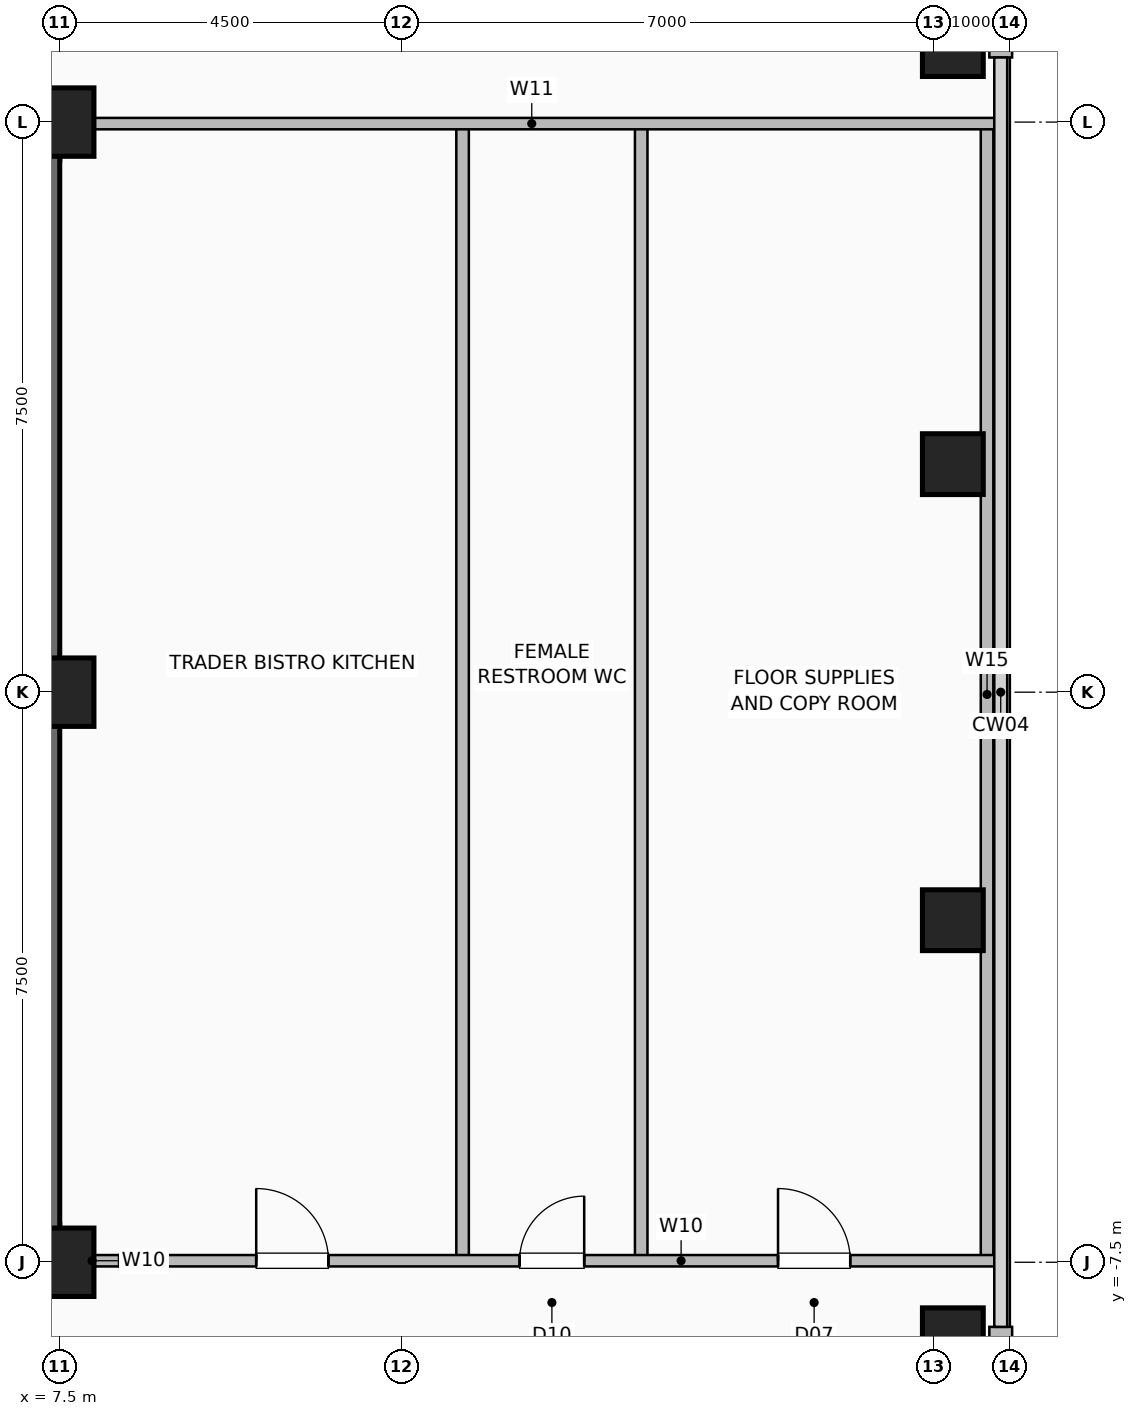
"""IFC4 building model, lengths in metres.
Left out: names, types, materials, properties, quantities, classifications, styles, units other than length and angle.
Written with IfcOpenShell. Run it as: python <this file> out.ifc"""

import sys

from ifc_helpers import new_model, si_unit, direction, frame, frame_2d, origin, origin_2d, place, context, subcontext, project, spatial, rectangle, hollow_rectangle, extrude, element, fill, save


model = new_model("IFC4")
c1 = context("Model", 3, precision=1e-05, world=origin(), true_north=direction((0.0, 1.0)))
c2 = subcontext(c1, "Body", "Model", "MODEL_VIEW")
j1 = project(units=[si_unit("LENGTHUNIT", "METRE"), si_unit("PLANEANGLEUNIT", "RADIAN")], contexts=[c1])
p1 = place(None, origin())
s1 = spatial("IfcSite", under=j1, at=p1, CompositionType="ELEMENT")
p2 = place(p1, origin())
s2 = spatial("IfcBuilding", under=s1, at=p2, CompositionType="ELEMENT")
p3 = place(p2, frame((0.0, 0.0, 213.0)))
s3 = spatial("IfcBuildingStorey", under=s2, at=p3, CompositionType="ELEMENT", Elevation=213.0)
for number, where, z_axis, x_axis in (
    (1, (7.5, -7.5, 0.0), (0.0, 0.0, 1.0), (1.0, 0.0, 0.0)),
    (2, (7.5, 0.0, 0.0), (0.0, 0.0, 1.0), (1.0, 0.0, 0.0)),
    (3, (7.5, 7.5, 0.0), (0.0, 0.0, 1.0), (1.0, 0.0, 0.0)),
):
    element("IfcColumn", number, at=place(p3, frame(where, z_axis=z_axis, x_axis=x_axis)), inside=s3, PredefinedType="COLUMN", context=c2, shape_type="SweptSolid", body=[
        extrude(hollow_rectangle(XDim=0.9, YDim=0.9, WallThickness=0.045, at=origin_2d()), origin(), (0.0, 0.0, 1.0), 3.6),
    ])
for number, where, z_axis, x_axis in (
    (4, (19.25, -8.5, 0.0), (0.0, 0.0, 1.0), (1.0, 0.0, 0.0)),
    (5, (19.25, -3.0, 0.0), (0.0, 0.0, 1.0), (1.0, 0.0, 0.0)),
    (6, (19.25, 3.0, 0.0), (0.0, 0.0, 1.0), (1.0, 0.0, 0.0)),
    (7, (19.25, 8.5, 0.0), (0.0, 0.0, 1.0), (1.0, 0.0, 0.0)),
):
    element("IfcColumn", number, at=place(p3, frame(where, z_axis=z_axis, x_axis=x_axis)), inside=s3, PredefinedType="COLUMN", context=c2, shape_type="SweptSolid", body=[
        extrude(hollow_rectangle(XDim=0.8, YDim=0.8, WallThickness=0.04, at=origin_2d()), origin(), (0.0, 0.0, 1.0), 3.6),
    ])
for number, where, z_axis, x_axis in (
    (8, (19.88, -13.15, 0.0), (0.0, 0.0, 1.0), (0.0, 1.0, 0.0)),
    (9, (19.88, 8.35, 0.0), (0.0, 0.0, 1.0), (0.0, 1.0, 0.0)),
):
    element("IfcWall", number, at=place(p3, frame(where, z_axis=z_axis, x_axis=x_axis)), inside=s3, PredefinedType="SOLIDWALL", context=c2, shape_type="SweptSolid", body=[
        extrude(rectangle(XDim=4.8, YDim=0.3, at=frame_2d((2.4, 0.0))), origin(), (0.0, 0.0, 1.0), 3.36),
    ])
p4 = place(p3, frame((-7.5, -7.25, 0.0), z_axis=(0.0, 0.0, 1.0), x_axis=(1.0, 0.0, 0.0)))
e10 = element("IfcWall", 10, at=p4, inside=s3, PredefinedType="SHEAR", context=c2, shape_type="SweptSolid", body=[
    extrude(rectangle(XDim=15.0, YDim=0.5, at=frame_2d((7.5, 0.0))), origin(), (0.0, 0.0, 1.0), 3.36),
])
p5 = place(p4, frame((1.55, 0.0, 0.0)))
e11 = element("IfcOpeningElement", 11, at=p5, cuts=e10, PredefinedType="OPENING", context=c2, shape_type="SweptSolid", body=[
    extrude(rectangle(XDim=1.05, YDim=2.08, at=frame_2d((0.525, 1.04))), frame((0.0, 0.26, 0.0), z_axis=(0.0, -1.0, 0.0), x_axis=(1.0, 0.0, 0.0)), (0.0, 0.0, 1.0), 0.52),
])
p6 = place(p4, frame((12.4, 0.0, 0.0)))
e12 = element("IfcOpeningElement", 12, at=p6, cuts=e10, PredefinedType="OPENING", context=c2, shape_type="SweptSolid", body=[
    extrude(rectangle(XDim=1.05, YDim=2.08, at=frame_2d((0.525, 1.04))), frame((0.0, 0.26, 0.0), z_axis=(0.0, -1.0, 0.0), x_axis=(1.0, 0.0, 0.0)), (0.0, 0.0, 1.0), 0.52),
])
p7 = place(p4, frame((5.2, 0.0, 0.0)))
e13 = element("IfcOpeningElement", 13, at=p7, cuts=e10, PredefinedType="OPENING", context=c2, shape_type="SweptSolid", body=[
    extrude(rectangle(XDim=1.0, YDim=2.08, at=frame_2d((0.5, 1.04))), frame((0.0, 0.26, 0.0), z_axis=(0.0, -1.0, 0.0), x_axis=(1.0, 0.0, 0.0)), (0.0, 0.0, 1.0), 0.52),
])
p8 = place(p4, frame((8.65, 0.0, 0.0)))
e14 = element("IfcOpeningElement", 14, at=p8, cuts=e10, PredefinedType="OPENING", context=c2, shape_type="SweptSolid", body=[
    extrude(rectangle(XDim=1.0, YDim=2.08, at=frame_2d((0.5, 1.04))), frame((0.0, 0.26, 0.0), z_axis=(0.0, -1.0, 0.0), x_axis=(1.0, 0.0, 0.0)), (0.0, 0.0, 1.0), 0.52),
])
for number, where, z_axis, x_axis in (
    (15, (-7.5, 7.25, 0.0), (0.0, 0.0, 1.0), (1.0, 0.0, 0.0)),
    (16, (7.25, -7.5, 0.0), (0.0, 0.0, 1.0), (0.0, 1.0, 0.0)),
):
    element("IfcWall", number, at=place(p3, frame(where, z_axis=z_axis, x_axis=x_axis)), inside=s3, PredefinedType="SHEAR", context=c2, shape_type="SweptSolid", body=[
        extrude(rectangle(XDim=15.0, YDim=0.5, at=frame_2d((7.5, 0.0))), origin(), (0.0, 0.0, 1.0), 3.36),
    ])
p9 = place(p3, frame((7.45, -7.48, 0.0), z_axis=(0.0, 0.0, 1.0), x_axis=(1.0, 0.0, 0.0)))
e17 = element("IfcWall", 17, at=p9, inside=s3, PredefinedType="PARTITIONING", context=c2, shape_type="SweptSolid", body=[
    extrude(rectangle(XDim=0.95, YDim=0.15, at=frame_2d((0.475, 0.0))), origin(), (0.0, 0.0, 1.0), 3.36),
])
for number, where, z_axis, x_axis in (
    (18, (15.15, -7.48, 0.0), (0.0, 0.0, 1.0), (0.0, 1.0, 0.0)),
    (19, (12.8, -7.48, 0.0), (0.0, 0.0, 1.0), (0.0, 1.0, 0.0)),
    (20, (19.7, -7.48, 0.0), (0.0, 0.0, 1.0), (0.0, 1.0, 0.0)),
):
    element("IfcWall", number, at=place(p3, frame(where, z_axis=z_axis, x_axis=x_axis)), inside=s3, PredefinedType="PLUMBINGWALL", context=c2, shape_type="SweptSolid", body=[
        extrude(rectangle(XDim=14.9, YDim=0.165, at=frame_2d((7.45, 0.0))), origin(), (0.0, 0.0, 1.0), 3.36),
    ])
p10 = place(p3, frame((8.28, -7.48, 0.0), z_axis=(0.0, 0.0, 1.0), x_axis=(1.0, 0.0, 0.0)))
e21 = element("IfcWall", 21, at=p10, inside=s3, PredefinedType="PARTITIONING", context=c2, shape_type="SweptSolid", body=[
    extrude(rectangle(XDim=11.54, YDim=0.15, at=frame_2d((5.77, 0.0))), origin(), (0.0, 0.0, 1.0), 3.36),
])
p11 = place(p10, frame((1.805, 0.0, 0.0)))
e22 = element("IfcOpeningElement", 22, at=p11, cuts=e21, PredefinedType="OPENING", context=c2, shape_type="SweptSolid", body=[
    extrude(rectangle(XDim=0.95, YDim=2.06, at=frame_2d((0.475, 1.03))), frame((0.0, 0.085, 0.0), z_axis=(0.0, -1.0, 0.0), x_axis=(1.0, 0.0, 0.0)), (0.0, 0.0, 1.0), 0.17),
])
p12 = place(p10, frame((5.27, 0.0, 0.0)))
e23 = element("IfcOpeningElement", 23, at=p12, cuts=e21, PredefinedType="OPENING", context=c2, shape_type="SweptSolid", body=[
    extrude(rectangle(XDim=0.85, YDim=2.05, at=frame_2d((0.425, 1.025))), frame((0.0, 0.085, 0.0), z_axis=(0.0, -1.0, 0.0), x_axis=(1.0, 0.0, 0.0)), (0.0, 0.0, 1.0), 0.17),
])
p13 = place(p10, frame((8.67, 0.0, 0.0)))
e24 = element("IfcOpeningElement", 24, at=p13, cuts=e21, PredefinedType="OPENING", context=c2, shape_type="SweptSolid", body=[
    extrude(rectangle(XDim=0.95, YDim=2.06, at=frame_2d((0.475, 1.03))), frame((0.0, 0.085, 0.0), z_axis=(0.0, -1.0, 0.0), x_axis=(1.0, 0.0, 0.0)), (0.0, 0.0, 1.0), 0.17),
])
p14 = place(p3, frame((7.6, 7.48, 0.0), z_axis=(0.0, 0.0, 1.0), x_axis=(1.0, 0.0, 0.0)))
e25 = element("IfcWall", 25, at=p14, inside=s3, PredefinedType="PARTITIONING", context=c2, shape_type="SweptSolid", body=[
    extrude(rectangle(XDim=12.22, YDim=0.15, at=frame_2d((6.11, 0.0))), origin(), (0.0, 0.0, 1.0), 3.36),
])
p15 = place(p11, origin())
e26 = element("IfcDoor", 26, at=p15, inside=s3, OperationType="SINGLE_SWING_LEFT", PredefinedType="DOOR", context=c2, shape_type="SweptSolid", body=[
    extrude(rectangle(XDim=0.95, YDim=2.06, at=frame_2d((0.475, 1.03))), frame((0.0, 0.025, 0.0), z_axis=(0.0, -1.0, 0.0), x_axis=(1.0, 0.0, 0.0)), (0.0, 0.0, 1.0), 0.05),
])
fill(e22, e26)
p16 = place(p12, origin())
e27 = element("IfcDoor", 27, at=p16, inside=s3, OperationType="SINGLE_SWING_RIGHT", PredefinedType="DOOR", context=c2, shape_type="SweptSolid", body=[
    extrude(rectangle(XDim=0.85, YDim=2.05, at=frame_2d((0.425, 1.025))), frame((0.0, 0.025, 0.0), z_axis=(0.0, -1.0, 0.0), x_axis=(1.0, 0.0, 0.0)), (0.0, 0.0, 1.0), 0.05),
])
fill(e23, e27)
p17 = place(p13, origin())
e28 = element("IfcDoor", 28, at=p17, inside=s3, OperationType="SINGLE_SWING_LEFT", PredefinedType="DOOR", context=c2, shape_type="SweptSolid", body=[
    extrude(rectangle(XDim=0.95, YDim=2.06, at=frame_2d((0.475, 1.03))), frame((0.0, 0.025, 0.0), z_axis=(0.0, -1.0, 0.0), x_axis=(1.0, 0.0, 0.0)), (0.0, 0.0, 1.0), 0.05),
])
fill(e24, e28)
save(model, sys.argv[1])
